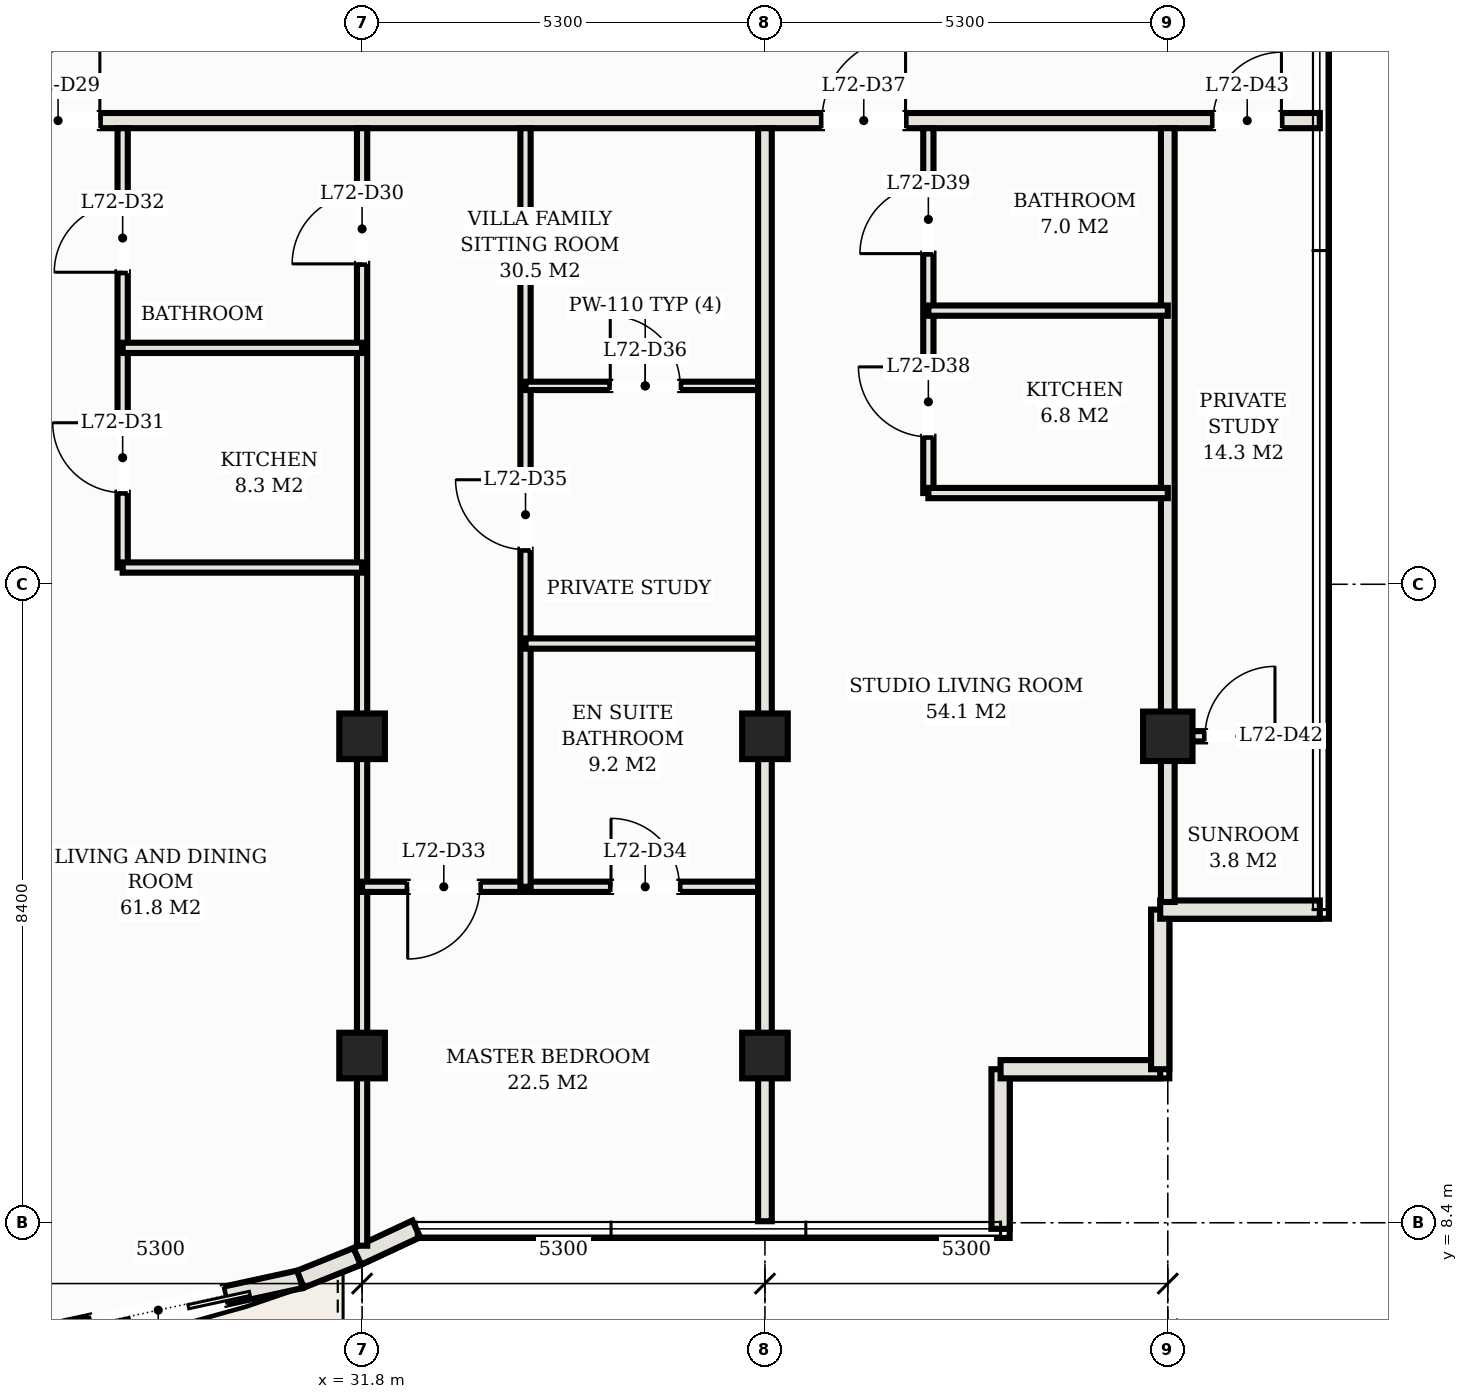
"""IFC4 building model, lengths in metres.
Left out: names, types, materials, properties, quantities, classifications, styles, units other than length and angle.
Written with IfcOpenShell. Run it as: python <this file> out.ifc"""

import sys

from ifc_helpers import new_model, si_unit, direction, frame, frame_2d, origin, origin_2d, place, context, subcontext, project, spatial, rectangle, hollow_rectangle, extrude, element, fill, save


model = new_model("IFC4")
c1 = context("Model", 3, precision=1e-05, world=origin(), true_north=direction((0.0, 1.0)))
c2 = subcontext(c1, "Body", "Model", "MODEL_VIEW")
j1 = project(units=[si_unit("LENGTHUNIT", "METRE"), si_unit("PLANEANGLEUNIT", "RADIAN")], contexts=[c1])
p1 = place(None, origin())
s1 = spatial("IfcSite", under=j1, at=p1, CompositionType="ELEMENT")
p2 = place(p1, origin())
s2 = spatial("IfcBuilding", under=s1, at=p2, CompositionType="ELEMENT")
p3 = place(p2, frame((0.0, 0.0, 259.4)))
s3 = spatial("IfcBuildingStorey", under=s2, at=p3, CompositionType="ELEMENT", Elevation=259.4)
for number, where, z_axis, x_axis in (
    (1, (31.8, 14.8, 0.0), (0.0, 0.0, 1.0), (1.0, 0.0, 0.0)),
    (2, (31.8, 10.6, 0.0), (0.0, 0.0, 1.0), (1.0, 0.0, 0.0)),
    (3, (37.1, 14.8, 0.0), (0.0, 0.0, 1.0), (1.0, 0.0, 0.0)),
    (4, (37.1, 10.6, 0.0), (0.0, 0.0, 1.0), (1.0, 0.0, 0.0)),
):
    element("IfcColumn", number, at=place(p3, frame(where, z_axis=z_axis, x_axis=x_axis)), inside=s3, PredefinedType="COLUMN", context=c2, shape_type="SweptSolid", body=[
        extrude(hollow_rectangle(XDim=0.6, YDim=0.6, WallThickness=0.022, at=origin_2d()), origin(), (0.0, 0.0, 1.0), 3.3),
    ])
p4 = place(p3, frame((42.4, 14.8, 0.0), z_axis=(0.0, 0.0, 1.0), x_axis=(1.0, 0.0, 0.0)))
e5 = element("IfcColumn", 5, at=p4, inside=s3, PredefinedType="COLUMN", context=c2, shape_type="SweptSolid", body=[
    extrude(hollow_rectangle(XDim=0.65, YDim=0.65, WallThickness=0.022, at=origin_2d()), origin(), (0.0, 0.0, 1.0), 3.3),
])
p5 = place(p3, frame((27.248, 6.843, 0.0), z_axis=(0.0, 0.0, 1.0), x_axis=(0.977126252677, 0.212660025225, 0.0)))
e6 = element("IfcWall", 6, at=p5, inside=s3, PredefinedType="SOLIDWALL", context=c2, shape_type="SweptSolid", body=[
    extrude(rectangle(XDim=3.828, YDim=0.24, at=frame_2d((1.914, 0.0))), origin(), (0.0, 0.0, 1.0), 3.11),
])
p6 = place(p5, frame((1.014, 0.0, 0.0)))
e7 = element("IfcOpeningElement", 7, at=p6, cuts=e6, PredefinedType="OPENING", context=c2, shape_type="SweptSolid", body=[
    extrude(rectangle(XDim=1.8, YDim=2.2, at=frame_2d((0.9, 1.1))), frame((0.0, 0.13, 0.0), z_axis=(0.0, -1.0, 0.0), x_axis=(1.0, 0.0, 0.0)), (0.0, 0.0, 1.0), 0.26),
])
p7 = place(p3, frame((30.988, 7.657, 0.0), z_axis=(0.0, 0.0, 1.0), x_axis=(0.927870589467, 0.372902358805, 0.0)))
e8 = element("IfcWall", 8, at=p7, inside=s3, PredefinedType="SOLIDWALL", context=c2, shape_type="SweptSolid", body=[
    extrude(rectangle(XDim=0.807, YDim=0.24, at=frame_2d((0.404, 0.0))), origin(), (0.0, 0.0, 1.0), 3.11),
])
p8 = place(p3, frame((31.737, 7.958, 0.0), z_axis=(0.0, 0.0, 1.0), x_axis=(0.906190424584, 0.422869855147, 0.0)))
e9 = element("IfcWall", 9, at=p8, inside=s3, PredefinedType="SOLIDWALL", context=c2, shape_type="SweptSolid", body=[
    extrude(rectangle(XDim=0.856, YDim=0.24, at=frame_2d((0.428, 0.0))), origin(), (0.0, 0.0, 1.0), 3.11),
])
p9 = place(p3, frame((40.2, 8.32, 0.0), z_axis=(0.0, 0.0, 1.0), x_axis=(0.0, 1.0, 0.0)))
e10 = element("IfcWall", 10, at=p9, inside=s3, PredefinedType="SOLIDWALL", context=c2, shape_type="SweptSolid", body=[
    extrude(rectangle(XDim=2.1, YDim=0.24, at=frame_2d((1.05, 0.0))), origin(), (0.0, 0.0, 1.0), 3.11),
])
for number, where, z_axis, x_axis in (
    (11, (40.2, 10.42, 0.0), (0.0, 0.0, 1.0), (1.0, 0.0, 0.0)),
    (12, (42.3, 10.42, 0.0), (0.0, 0.0, 1.0), (0.0, 1.0, 0.0)),
):
    element("IfcWall", number, at=place(p3, frame(where, z_axis=z_axis, x_axis=x_axis)), inside=s3, PredefinedType="SOLIDWALL", context=c2, shape_type="SweptSolid", body=[
        extrude(rectangle(XDim=2.1, YDim=0.24, at=frame_2d((1.05, 0.0))), origin(), (0.0, 0.0, 1.0), 3.11),
    ])
p10 = place(p3, frame((42.3, 12.52, 0.0), z_axis=(0.0, 0.0, 1.0), x_axis=(1.0, 0.0, 0.0)))
e13 = element("IfcWall", 13, at=p10, inside=s3, PredefinedType="SOLIDWALL", context=c2, shape_type="SweptSolid", body=[
    extrude(rectangle(XDim=2.1, YDim=0.24, at=frame_2d((1.05, 0.0))), origin(), (0.0, 0.0, 1.0), 3.11),
])
p11 = place(p3, frame((8.6, 22.9, 0.0), z_axis=(0.0, 0.0, 1.0), x_axis=(1.0, 0.0, 0.0)))
e14 = element("IfcWall", 14, at=p11, inside=s3, PredefinedType="PARTITIONING", context=c2, shape_type="SweptSolid", body=[
    extrude(rectangle(XDim=35.8, YDim=0.2, at=frame_2d((17.9, 0.0))), origin(), (0.0, 0.0, 1.0), 2.45),
])
p12 = place(p11, frame((2.625, 0.0, 0.0)))
e15 = element("IfcOpeningElement", 15, at=p12, cuts=e14, PredefinedType="OPENING", context=c2, shape_type="SweptSolid", body=[
    extrude(rectangle(XDim=1.35, YDim=2.33, at=frame_2d((0.675, 1.165))), frame((0.0, 0.11, 0.0), z_axis=(0.0, -1.0, 0.0), x_axis=(1.0, 0.0, 0.0)), (0.0, 0.0, 1.0), 0.22),
])
p13 = place(p11, frame((18.65, 0.0, 0.0)))
e16 = element("IfcOpeningElement", 16, at=p13, cuts=e14, PredefinedType="OPENING", context=c2, shape_type="SweptSolid", body=[
    extrude(rectangle(XDim=1.1, YDim=2.25, at=frame_2d((0.55, 1.125))), frame((0.0, 0.11, 0.0), z_axis=(0.0, -1.0, 0.0), x_axis=(1.0, 0.0, 0.0)), (0.0, 0.0, 1.0), 0.22),
])
p14 = place(p11, frame((29.25, 0.0, 0.0)))
e17 = element("IfcOpeningElement", 17, at=p14, cuts=e14, PredefinedType="OPENING", context=c2, shape_type="SweptSolid", body=[
    extrude(rectangle(XDim=1.1, YDim=2.25, at=frame_2d((0.55, 1.125))), frame((0.0, 0.11, 0.0), z_axis=(0.0, -1.0, 0.0), x_axis=(1.0, 0.0, 0.0)), (0.0, 0.0, 1.0), 0.22),
])
p15 = place(p11, frame((0.505, 0.0, 0.0)))
e18 = element("IfcOpeningElement", 18, at=p15, cuts=e14, PredefinedType="OPENING", context=c2, shape_type="SweptSolid", body=[
    extrude(rectangle(XDim=0.9, YDim=2.15, at=frame_2d((0.45, 1.075))), frame((0.0, 0.11, 0.0), z_axis=(0.0, -1.0, 0.0), x_axis=(1.0, 0.0, 0.0)), (0.0, 0.0, 1.0), 0.22),
])
p16 = place(p11, frame((34.395, 0.0, 0.0)))
e19 = element("IfcOpeningElement", 19, at=p16, cuts=e14, PredefinedType="OPENING", context=c2, shape_type="SweptSolid", body=[
    extrude(rectangle(XDim=0.9, YDim=2.15, at=frame_2d((0.45, 1.075))), frame((0.0, 0.11, 0.0), z_axis=(0.0, -1.0, 0.0), x_axis=(1.0, 0.0, 0.0)), (0.0, 0.0, 1.0), 0.22),
])
p17 = place(p3, frame((42.4, 12.62, 0.0), z_axis=(0.0, 0.0, 1.0), x_axis=(0.0, 1.0, 0.0)))
e20 = element("IfcWall", 20, at=p17, inside=s3, PredefinedType="PARTITIONING", context=c2, shape_type="SweptSolid", body=[
    extrude(rectangle(XDim=10.18, YDim=0.18, at=frame_2d((5.09, 0.0))), origin(), (0.0, 0.0, 1.0), 2.45),
])
p18 = place(p3, frame((31.8, 8.098, 0.0), z_axis=(0.0, 0.0, 1.0), x_axis=(0.0, 1.0, 0.0)))
e21 = element("IfcWall", 21, at=p18, inside=s3, PredefinedType="PARTITIONING", context=c2, shape_type="SweptSolid", body=[
    extrude(rectangle(XDim=14.702, YDim=0.135, at=frame_2d((7.351, 0.0))), origin(), (0.0, 0.0, 1.0), 2.45),
])
p19 = place(p18, frame((12.917, 0.0, 0.0)))
e22 = element("IfcOpeningElement", 22, at=p19, cuts=e21, PredefinedType="OPENING", context=c2, shape_type="SweptSolid", body=[
    extrude(rectangle(XDim=0.92, YDim=2.15, at=frame_2d((0.46, 1.075))), frame((0.0, 0.078, 0.0), z_axis=(0.0, -1.0, 0.0), x_axis=(1.0, 0.0, 0.0)), (0.0, 0.0, 1.0), 0.155),
])
p20 = place(p3, frame((28.65, 17.02, 0.0), z_axis=(0.0, 0.0, 1.0), x_axis=(0.0, 1.0, 0.0)))
e23 = element("IfcWall", 23, at=p20, inside=s3, PredefinedType="PARTITIONING", context=c2, shape_type="SweptSolid", body=[
    extrude(rectangle(XDim=5.78, YDim=0.135, at=frame_2d((2.89, 0.0))), origin(), (0.0, 0.0, 1.0), 2.45),
])
p21 = place(p20, frame((0.985, 0.0, 0.0)))
e24 = element("IfcOpeningElement", 24, at=p21, cuts=e23, PredefinedType="OPENING", context=c2, shape_type="SweptSolid", body=[
    extrude(rectangle(XDim=0.92, YDim=2.15, at=frame_2d((0.46, 1.075))), frame((0.0, 0.078, 0.0), z_axis=(0.0, -1.0, 0.0), x_axis=(1.0, 0.0, 0.0)), (0.0, 0.0, 1.0), 0.155),
])
p22 = place(p20, frame((3.885, 0.0, 0.0)))
e25 = element("IfcOpeningElement", 25, at=p22, cuts=e23, PredefinedType="OPENING", context=c2, shape_type="SweptSolid", body=[
    extrude(rectangle(XDim=0.9, YDim=2.15, at=frame_2d((0.45, 1.075))), frame((0.0, 0.078, 0.0), z_axis=(0.0, -1.0, 0.0), x_axis=(1.0, 0.0, 0.0)), (0.0, 0.0, 1.0), 0.155),
])
for number, where, z_axis, x_axis in (
    (26, (28.65, 17.02, 0.0), (0.0, 0.0, 1.0), (1.0, 0.0, 0.0)),
    (27, (28.65, 19.91, 0.0), (0.0, 0.0, 1.0), (1.0, 0.0, 0.0)),
):
    element("IfcWall", number, at=place(p3, frame(where, z_axis=z_axis, x_axis=x_axis)), inside=s3, PredefinedType="PARTITIONING", context=c2, shape_type="SweptSolid", body=[
        extrude(rectangle(XDim=3.15, YDim=0.135, at=frame_2d((1.575, 0.0))), origin(), (0.0, 0.0, 1.0), 2.45),
    ])
p23 = place(p3, frame((31.8, 12.82, 0.0), z_axis=(0.0, 0.0, 1.0), x_axis=(1.0, 0.0, 0.0)))
e28 = element("IfcWall", 28, at=p23, inside=s3, PredefinedType="PARTITIONING", context=c2, shape_type="SweptSolid", body=[
    extrude(rectangle(XDim=5.3, YDim=0.135, at=frame_2d((2.65, 0.0))), origin(), (0.0, 0.0, 1.0), 2.45),
])
p24 = place(p23, frame((0.6, 0.0, 0.0)))
e29 = element("IfcOpeningElement", 29, at=p24, cuts=e28, PredefinedType="OPENING", context=c2, shape_type="SweptSolid", body=[
    extrude(rectangle(XDim=0.95, YDim=2.15, at=frame_2d((0.475, 1.075))), frame((0.0, 0.078, 0.0), z_axis=(0.0, -1.0, 0.0), x_axis=(1.0, 0.0, 0.0)), (0.0, 0.0, 1.0), 0.155),
])
p25 = place(p23, frame((3.275, 0.0, 0.0)))
e30 = element("IfcOpeningElement", 30, at=p25, cuts=e28, PredefinedType="OPENING", context=c2, shape_type="SweptSolid", body=[
    extrude(rectangle(XDim=0.9, YDim=2.15, at=frame_2d((0.45, 1.075))), frame((0.0, 0.078, 0.0), z_axis=(0.0, -1.0, 0.0), x_axis=(1.0, 0.0, 0.0)), (0.0, 0.0, 1.0), 0.155),
])
p26 = place(p3, frame((33.95, 12.82, 0.0), z_axis=(0.0, 0.0, 1.0), x_axis=(0.0, 1.0, 0.0)))
e31 = element("IfcWall", 31, at=p26, inside=s3, PredefinedType="PARTITIONING", context=c2, shape_type="SweptSolid", body=[
    extrude(rectangle(XDim=9.98, YDim=0.135, at=frame_2d((4.99, 0.0))), origin(), (0.0, 0.0, 1.0), 2.45),
])
p27 = place(p26, frame((4.435, 0.0, 0.0)))
e32 = element("IfcOpeningElement", 32, at=p27, cuts=e31, PredefinedType="OPENING", context=c2, shape_type="SweptSolid", body=[
    extrude(rectangle(XDim=0.92, YDim=2.15, at=frame_2d((0.46, 1.075))), frame((0.0, 0.078, 0.0), z_axis=(0.0, -1.0, 0.0), x_axis=(1.0, 0.0, 0.0)), (0.0, 0.0, 1.0), 0.155),
])
p28 = place(p3, frame((33.95, 16.02, 0.0), z_axis=(0.0, 0.0, 1.0), x_axis=(1.0, 0.0, 0.0)))
e33 = element("IfcWall", 33, at=p28, inside=s3, PredefinedType="PARTITIONING", context=c2, shape_type="SweptSolid", body=[
    extrude(rectangle(XDim=3.15, YDim=0.135, at=frame_2d((1.575, 0.0))), origin(), (0.0, 0.0, 1.0), 2.45),
])
p29 = place(p3, frame((33.95, 19.41, 0.0), z_axis=(0.0, 0.0, 1.0), x_axis=(1.0, 0.0, 0.0)))
e34 = element("IfcWall", 34, at=p29, inside=s3, PredefinedType="MOVABLE", context=c2, shape_type="SweptSolid", body=[
    extrude(rectangle(XDim=3.15, YDim=0.11, at=frame_2d((1.575, 0.0))), origin(), (0.0, 0.0, 1.0), 2.45),
])
p30 = place(p29, frame((1.115, 0.0, 0.0)))
e35 = element("IfcOpeningElement", 35, at=p30, cuts=e34, PredefinedType="OPENING", context=c2, shape_type="SweptSolid", body=[
    extrude(rectangle(XDim=0.92, YDim=2.15, at=frame_2d((0.46, 1.075))), frame((0.0, 0.065, 0.0), z_axis=(0.0, -1.0, 0.0), x_axis=(1.0, 0.0, 0.0)), (0.0, 0.0, 1.0), 0.13),
])
p31 = place(p3, frame((37.1, 8.42, 0.0), z_axis=(0.0, 0.0, 1.0), x_axis=(0.0, 1.0, 0.0)))
e36 = element("IfcWall", 36, at=p31, inside=s3, PredefinedType="PARTITIONING", context=c2, shape_type="SweptSolid", body=[
    extrude(rectangle(XDim=14.38, YDim=0.18, at=frame_2d((7.19, 0.0))), origin(), (0.0, 0.0, 1.0), 2.45),
])
p32 = place(p3, frame((39.25, 18.0, 0.0), z_axis=(0.0, 0.0, 1.0), x_axis=(0.0, 1.0, 0.0)))
e37 = element("IfcWall", 37, at=p32, inside=s3, PredefinedType="PARTITIONING", context=c2, shape_type="SweptSolid", body=[
    extrude(rectangle(XDim=4.8, YDim=0.135, at=frame_2d((2.4, 0.0))), origin(), (0.0, 0.0, 1.0), 2.45),
])
p33 = place(p32, frame((0.74, 0.0, 0.0)))
e38 = element("IfcOpeningElement", 38, at=p33, cuts=e37, PredefinedType="OPENING", context=c2, shape_type="SweptSolid", body=[
    extrude(rectangle(XDim=0.92, YDim=2.15, at=frame_2d((0.46, 1.075))), frame((0.0, 0.078, 0.0), z_axis=(0.0, -1.0, 0.0), x_axis=(1.0, 0.0, 0.0)), (0.0, 0.0, 1.0), 0.155),
])
p34 = place(p32, frame((3.15, 0.0, 0.0)))
e39 = element("IfcOpeningElement", 39, at=p34, cuts=e37, PredefinedType="OPENING", context=c2, shape_type="SweptSolid", body=[
    extrude(rectangle(XDim=0.9, YDim=2.15, at=frame_2d((0.45, 1.075))), frame((0.0, 0.078, 0.0), z_axis=(0.0, -1.0, 0.0), x_axis=(1.0, 0.0, 0.0)), (0.0, 0.0, 1.0), 0.155),
])
for number, where, z_axis, x_axis in (
    (40, (39.25, 18.0, 0.0), (0.0, 0.0, 1.0), (1.0, 0.0, 0.0)),
    (41, (39.25, 20.4, 0.0), (0.0, 0.0, 1.0), (1.0, 0.0, 0.0)),
):
    element("IfcWall", number, at=place(p3, frame(where, z_axis=z_axis, x_axis=x_axis)), inside=s3, PredefinedType="PARTITIONING", context=c2, shape_type="SweptSolid", body=[
        extrude(rectangle(XDim=3.15, YDim=0.135, at=frame_2d((1.575, 0.0))), origin(), (0.0, 0.0, 1.0), 2.45),
    ])
p35 = place(p3, frame((42.4, 14.8, 0.0), z_axis=(0.0, 0.0, 1.0), x_axis=(1.0, 0.0, 0.0)))
e42 = element("IfcWall", 42, at=p35, inside=s3, PredefinedType="PARTITIONING", context=c2, shape_type="SweptSolid", body=[
    extrude(rectangle(XDim=1.9, YDim=0.135, at=frame_2d((0.95, 0.0))), origin(), (0.0, 0.0, 1.0), 2.45),
])
p36 = place(p35, frame((0.49, 0.0, 0.0)))
e43 = element("IfcOpeningElement", 43, at=p36, cuts=e42, PredefinedType="OPENING", context=c2, shape_type="SweptSolid", body=[
    extrude(rectangle(XDim=0.92, YDim=2.15, at=frame_2d((0.46, 1.075))), frame((0.0, 0.078, 0.0), z_axis=(0.0, -1.0, 0.0), x_axis=(1.0, 0.0, 0.0)), (0.0, 0.0, 1.0), 0.155),
])
p37 = place(p6, frame((1.8, 0.0, 0.0), z_axis=(0.0, 0.0, 1.0), x_axis=(-1.0, 0.0, 0.0)))
e44 = element("IfcDoor", 44, at=p37, inside=s3, OperationType="DOUBLE_DOOR_SLIDING", PredefinedType="DOOR", context=c2, shape_type="SweptSolid", body=[
    extrude(rectangle(XDim=1.8, YDim=2.2, at=frame_2d((0.9, 1.1))), frame((0.0, 0.025, 0.0), z_axis=(0.0, -1.0, 0.0), x_axis=(1.0, 0.0, 0.0)), (0.0, 0.0, 1.0), 0.05),
])
fill(e7, e44)
p38 = place(p13, origin())
e45 = element("IfcDoor", 45, at=p38, inside=s3, OperationType="SINGLE_SWING_RIGHT", PredefinedType="DOOR", context=c2, shape_type="SweptSolid", body=[
    extrude(rectangle(XDim=1.1, YDim=2.25, at=frame_2d((0.55, 1.125))), frame((0.0, 0.025, 0.0), z_axis=(0.0, -1.0, 0.0), x_axis=(1.0, 0.0, 0.0)), (0.0, 0.0, 1.0), 0.05),
])
fill(e16, e45)
p39 = place(p19, origin())
e46 = element("IfcDoor", 46, at=p39, inside=s3, OperationType="SINGLE_SWING_LEFT", PredefinedType="DOOR", context=c2, shape_type="SweptSolid", body=[
    extrude(rectangle(XDim=0.92, YDim=2.15, at=frame_2d((0.46, 1.075))), frame((0.0, 0.025, 0.0), z_axis=(0.0, -1.0, 0.0), x_axis=(1.0, 0.0, 0.0)), (0.0, 0.0, 1.0), 0.05),
])
fill(e22, e46)
p40 = place(p21, origin())
e47 = element("IfcDoor", 47, at=p40, inside=s3, OperationType="SINGLE_SWING_RIGHT", PredefinedType="DOOR", context=c2, shape_type="SweptSolid", body=[
    extrude(rectangle(XDim=0.92, YDim=2.15, at=frame_2d((0.46, 1.075))), frame((0.0, 0.025, 0.0), z_axis=(0.0, -1.0, 0.0), x_axis=(1.0, 0.0, 0.0)), (0.0, 0.0, 1.0), 0.05),
])
fill(e24, e47)
p41 = place(p22, origin())
e48 = element("IfcDoor", 48, at=p41, inside=s3, OperationType="SINGLE_SWING_LEFT", PredefinedType="DOOR", context=c2, shape_type="SweptSolid", body=[
    extrude(rectangle(XDim=0.9, YDim=2.15, at=frame_2d((0.45, 1.075))), frame((0.0, 0.025, 0.0), z_axis=(0.0, -1.0, 0.0), x_axis=(1.0, 0.0, 0.0)), (0.0, 0.0, 1.0), 0.05),
])
fill(e25, e48)
p42 = place(p24, frame((0.95, 0.0, 0.0), z_axis=(0.0, 0.0, 1.0), x_axis=(-1.0, 0.0, 0.0)))
e49 = element("IfcDoor", 49, at=p42, inside=s3, OperationType="SINGLE_SWING_RIGHT", PredefinedType="DOOR", context=c2, shape_type="SweptSolid", body=[
    extrude(rectangle(XDim=0.95, YDim=2.15, at=frame_2d((0.475, 1.075))), frame((0.0, 0.025, 0.0), z_axis=(0.0, -1.0, 0.0), x_axis=(1.0, 0.0, 0.0)), (0.0, 0.0, 1.0), 0.05),
])
fill(e29, e49)
p43 = place(p25, origin())
e50 = element("IfcDoor", 50, at=p43, inside=s3, OperationType="SINGLE_SWING_LEFT", PredefinedType="DOOR", context=c2, shape_type="SweptSolid", body=[
    extrude(rectangle(XDim=0.9, YDim=2.15, at=frame_2d((0.45, 1.075))), frame((0.0, 0.025, 0.0), z_axis=(0.0, -1.0, 0.0), x_axis=(1.0, 0.0, 0.0)), (0.0, 0.0, 1.0), 0.05),
])
fill(e30, e50)
p44 = place(p27, origin())
e51 = element("IfcDoor", 51, at=p44, inside=s3, OperationType="SINGLE_SWING_RIGHT", PredefinedType="DOOR", context=c2, shape_type="SweptSolid", body=[
    extrude(rectangle(XDim=0.92, YDim=2.15, at=frame_2d((0.46, 1.075))), frame((0.0, 0.025, 0.0), z_axis=(0.0, -1.0, 0.0), x_axis=(1.0, 0.0, 0.0)), (0.0, 0.0, 1.0), 0.05),
])
fill(e32, e51)
p45 = place(p30, origin())
e52 = element("IfcDoor", 52, at=p45, inside=s3, OperationType="SINGLE_SWING_LEFT", PredefinedType="DOOR", context=c2, shape_type="SweptSolid", body=[
    extrude(rectangle(XDim=0.92, YDim=2.15, at=frame_2d((0.46, 1.075))), frame((0.0, 0.025, 0.0), z_axis=(0.0, -1.0, 0.0), x_axis=(1.0, 0.0, 0.0)), (0.0, 0.0, 1.0), 0.05),
])
fill(e35, e52)
p46 = place(p14, origin())
e53 = element("IfcDoor", 53, at=p46, inside=s3, OperationType="SINGLE_SWING_RIGHT", PredefinedType="DOOR", context=c2, shape_type="SweptSolid", body=[
    extrude(rectangle(XDim=1.1, YDim=2.25, at=frame_2d((0.55, 1.125))), frame((0.0, 0.025, 0.0), z_axis=(0.0, -1.0, 0.0), x_axis=(1.0, 0.0, 0.0)), (0.0, 0.0, 1.0), 0.05),
])
fill(e17, e53)
p47 = place(p33, origin())
e54 = element("IfcDoor", 54, at=p47, inside=s3, OperationType="SINGLE_SWING_RIGHT", PredefinedType="DOOR", context=c2, shape_type="SweptSolid", body=[
    extrude(rectangle(XDim=0.92, YDim=2.15, at=frame_2d((0.46, 1.075))), frame((0.0, 0.025, 0.0), z_axis=(0.0, -1.0, 0.0), x_axis=(1.0, 0.0, 0.0)), (0.0, 0.0, 1.0), 0.05),
])
fill(e38, e54)
p48 = place(p34, origin())
e55 = element("IfcDoor", 55, at=p48, inside=s3, OperationType="SINGLE_SWING_LEFT", PredefinedType="DOOR", context=c2, shape_type="SweptSolid", body=[
    extrude(rectangle(XDim=0.9, YDim=2.15, at=frame_2d((0.45, 1.075))), frame((0.0, 0.025, 0.0), z_axis=(0.0, -1.0, 0.0), x_axis=(1.0, 0.0, 0.0)), (0.0, 0.0, 1.0), 0.05),
])
fill(e39, e55)
p49 = place(p36, origin())
e56 = element("IfcDoor", 56, at=p49, inside=s3, OperationType="SINGLE_SWING_RIGHT", PredefinedType="DOOR", context=c2, shape_type="SweptSolid", body=[
    extrude(rectangle(XDim=0.92, YDim=2.15, at=frame_2d((0.46, 1.075))), frame((0.0, 0.025, 0.0), z_axis=(0.0, -1.0, 0.0), x_axis=(1.0, 0.0, 0.0)), (0.0, 0.0, 1.0), 0.05),
])
fill(e43, e56)
p50 = place(p16, origin())
e57 = element("IfcDoor", 57, at=p50, inside=s3, OperationType="SINGLE_SWING_RIGHT", PredefinedType="DOOR", context=c2, shape_type="SweptSolid", body=[
    extrude(rectangle(XDim=0.9, YDim=2.15, at=frame_2d((0.45, 1.075))), frame((0.0, 0.025, 0.0), z_axis=(0.0, -1.0, 0.0), x_axis=(1.0, 0.0, 0.0)), (0.0, 0.0, 1.0), 0.05),
])
fill(e19, e57)
save(model, sys.argv[1])
